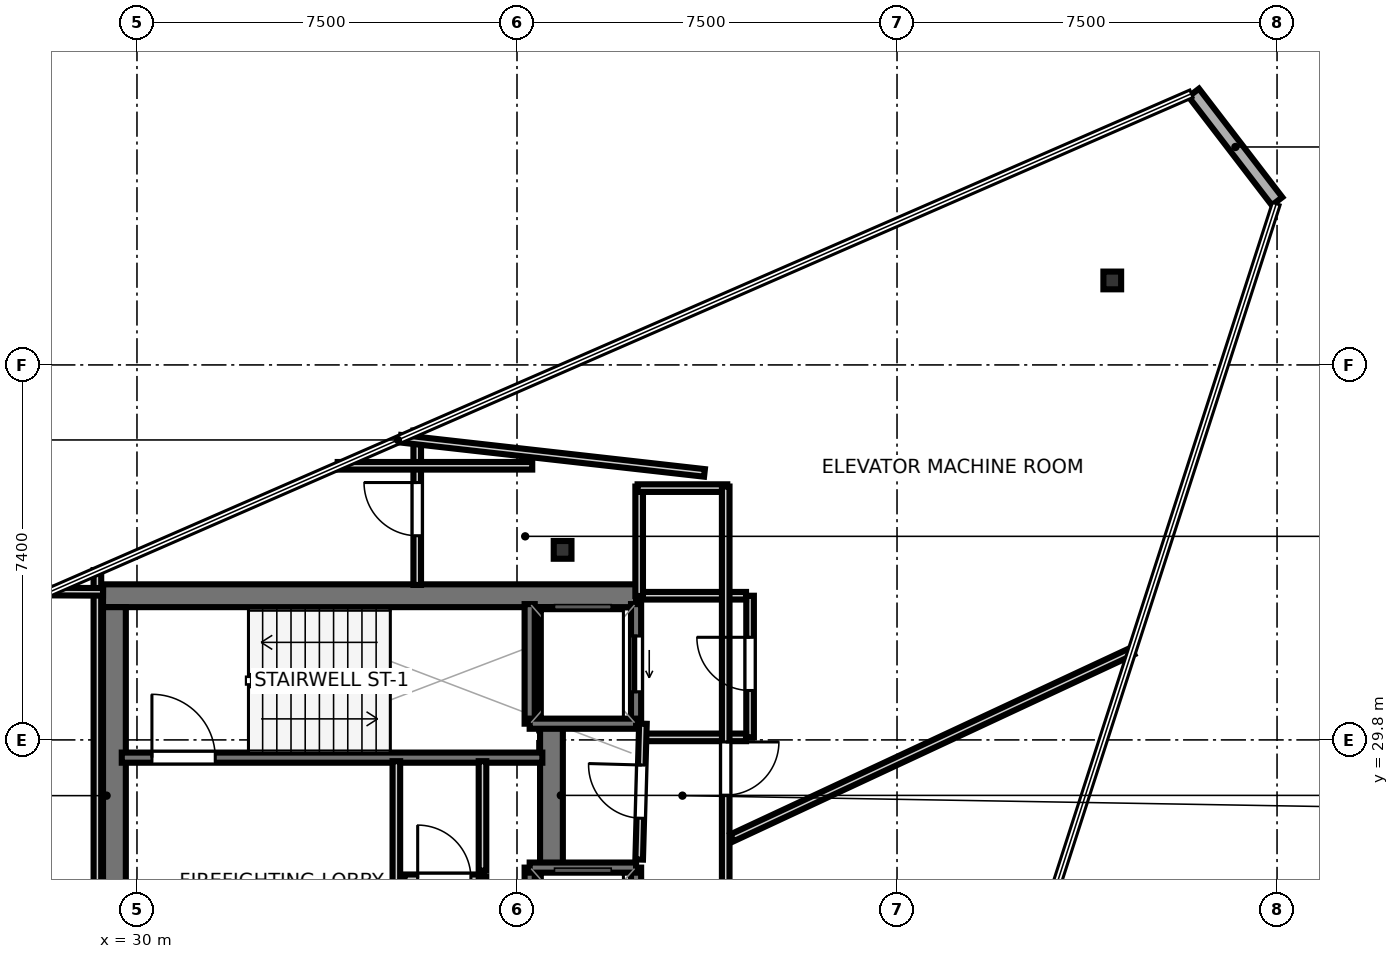
"""IFC4 building model, lengths in metres.
Left out: names, types, materials, properties, quantities, classifications, styles, units other than length and angle.
Written with IfcOpenShell. Run it as: python <this file> out.ifc"""

import sys

from ifc_helpers import new_model, si_unit, direction, frame, frame_2d, origin, origin_2d, place, context, subcontext, project, spatial, rectangle, i_section, extrude, element, fill, save


model = new_model("IFC4")
c1 = context("Model", 3, precision=1e-05, world=origin(), true_north=direction((0.0, 1.0)))
c2 = subcontext(c1, "Body", "Model", "MODEL_VIEW")
j1 = project(units=[si_unit("LENGTHUNIT", "METRE"), si_unit("PLANEANGLEUNIT", "RADIAN")], contexts=[c1])
p1 = place(None, origin())
s1 = spatial("IfcSite", under=j1, at=p1, CompositionType="ELEMENT")
p2 = place(p1, origin())
s2 = spatial("IfcBuilding", under=s1, at=p2, CompositionType="ELEMENT")
p3 = place(p2, frame((0.0, 0.0, 360.05)))
s3 = spatial("IfcBuildingStorey", under=s2, at=p3, CompositionType="ELEMENT", Elevation=360.05)
p4 = place(p3, frame((29.33, 32.645, 0.0), z_axis=(0.0, 0.0, 1.0), x_axis=(1.0, 0.0, 0.0)))
e1 = element("IfcWall", 1, at=p4, inside=s3, PredefinedType="SHEAR", context=c2, shape_type="SweptSolid", body=[
    extrude(rectangle(XDim=10.52, YDim=0.45, at=frame_2d((5.26, 0.0))), origin(), (0.0, 0.0, 1.0), 3.55),
])
for number, where, z_axis, x_axis in (
    (2, (29.555, 24.98, 0.0), (0.0, 0.0, 1.0), (0.0, 1.0, 0.0)),
    (3, (38.18, 24.98, 0.0), (0.0, 0.0, 1.0), (0.0, 1.0, 0.0)),
):
    element("IfcWall", number, at=place(p3, frame(where, z_axis=z_axis, x_axis=x_axis)), inside=s3, PredefinedType="SHEAR", context=c2, shape_type="SweptSolid", body=[
        extrude(rectangle(XDim=7.44, YDim=0.45, at=frame_2d((3.72, 0.0))), origin(), (0.0, 0.0, 1.0), 3.55),
    ])
for number, where, z_axis, x_axis in (
    (4, (38.4, 33.55, 0.0), (0.0, 0.0, 1.0), (1.0, 0.0, 0.0)),
    (5, (49.248, 38.867, 0.0), (0.0, 0.0, 1.0), (1.0, 0.0, 0.0)),
):
    element("IfcColumn", number, at=place(p3, frame(where, z_axis=z_axis, x_axis=x_axis)), inside=s3, PredefinedType="COLUMN", context=c2, shape_type="SweptSolid", body=[
        extrude(i_section(OverallWidth=0.35, OverallDepth=0.35, WebThickness=0.012, FlangeThickness=0.019, at=origin_2d()), origin(), (0.0, 0.0, 1.0), 3.75),
    ])
p5 = place(p3, frame((52.5, 40.43, 0.0), z_axis=(0.0, 0.0, 1.0), x_axis=(-0.608757921377, 0.79335603178, 0.0)))
e6 = element("IfcWall", 6, at=p5, inside=s3, PredefinedType="SOLIDWALL", context=c2, shape_type="SweptSolid", body=[
    extrude(rectangle(XDim=2.701, YDim=0.26, at=frame_2d((1.35, 0.0))), origin(), (0.0, 0.0, 1.0), 3.55),
])
p6 = place(p3, frame((29.7, 29.45, 0.0), z_axis=(0.0, 0.0, 1.0), x_axis=(1.0, 0.0, 0.0)))
e7 = element("IfcWall", 7, at=p6, inside=s3, PredefinedType="SOLIDWALL", context=c2, shape_type="SweptSolid", body=[
    extrude(rectangle(XDim=8.3, YDim=0.2, at=frame_2d((4.15, 0.0))), origin(), (0.0, 0.0, 1.0), 3.55),
])
p7 = place(p6, frame((0.595, 0.0, 0.0)))
e8 = element("IfcOpeningElement", 8, at=p7, cuts=e7, PredefinedType="OPENING", context=c2, shape_type="SweptSolid", body=[
    extrude(rectangle(XDim=1.25, YDim=2.15, at=frame_2d((0.625, 1.075))), frame((0.0, 0.11, 0.0), z_axis=(0.0, -1.0, 0.0), x_axis=(1.0, 0.0, 0.0)), (0.0, 0.0, 1.0), 0.22),
])
p8 = place(p3, frame((39.85, 30.12, 0.0), z_axis=(0.0, 0.0, 1.0), x_axis=(0.0, 1.0, 0.0)))
e9 = element("IfcWall", 9, at=p8, inside=s3, PredefinedType="SOLIDWALL", context=c2, shape_type="SweptSolid", body=[
    extrude(rectangle(XDim=2.36, YDim=0.2, at=frame_2d((1.18, 0.0))), origin(), (0.0, 0.0, 1.0), 3.55),
])
p9 = place(p8, frame((0.63, 0.0, 0.0)))
e10 = element("IfcOpeningElement", 10, at=p9, cuts=e9, PredefinedType="OPENING", context=c2, shape_type="SweptSolid", body=[
    extrude(rectangle(XDim=1.1, YDim=2.15, at=frame_2d((0.55, 1.075))), frame((0.0, 0.11, 0.0), z_axis=(0.0, -1.0, 0.0), x_axis=(1.0, 0.0, 0.0)), (0.0, 0.0, 1.0), 0.22),
])
p10 = place(p3, frame((37.75, 30.12, 0.0), z_axis=(0.0, 0.0, 1.0), x_axis=(0.0, 1.0, 0.0)))
e11 = element("IfcWall", 11, at=p10, inside=s3, PredefinedType="SOLIDWALL", context=c2, shape_type="SweptSolid", body=[
    extrude(rectangle(XDim=2.36, YDim=0.2, at=frame_2d((1.18, 0.0))), origin(), (0.0, 0.0, 1.0), 3.55),
])
p11 = place(p3, frame((37.75, 30.12, 0.0), z_axis=(0.0, 0.0, 1.0), x_axis=(1.0, 0.0, 0.0)))
e12 = element("IfcWall", 12, at=p11, inside=s3, PredefinedType="SOLIDWALL", context=c2, shape_type="SweptSolid", body=[
    extrude(rectangle(XDim=2.1, YDim=0.2, at=frame_2d((1.05, 0.0))), origin(), (0.0, 0.0, 1.0), 3.55),
])
p12 = place(p3, frame((39.85, 24.92, 0.0), z_axis=(0.0, 0.0, 1.0), x_axis=(0.0, 1.0, 0.0)))
e13 = element("IfcWall", 13, at=p12, inside=s3, PredefinedType="SOLIDWALL", context=c2, shape_type="SweptSolid", body=[
    extrude(rectangle(XDim=2.36, YDim=0.2, at=frame_2d((1.18, 0.0))), origin(), (0.0, 0.0, 1.0), 3.55),
])
p13 = place(p12, frame((0.63, 0.0, 0.0)))
e14 = element("IfcOpeningElement", 14, at=p13, cuts=e13, PredefinedType="OPENING", context=c2, shape_type="SweptSolid", body=[
    extrude(rectangle(XDim=1.1, YDim=2.15, at=frame_2d((0.55, 1.075))), frame((0.0, 0.11, 0.0), z_axis=(0.0, -1.0, 0.0), x_axis=(1.0, 0.0, 0.0)), (0.0, 0.0, 1.0), 0.22),
])
p14 = place(p3, frame((37.75, 24.92, 0.0), z_axis=(0.0, 0.0, 1.0), x_axis=(0.0, 1.0, 0.0)))
e15 = element("IfcWall", 15, at=p14, inside=s3, PredefinedType="SOLIDWALL", context=c2, shape_type="SweptSolid", body=[
    extrude(rectangle(XDim=2.36, YDim=0.2, at=frame_2d((1.18, 0.0))), origin(), (0.0, 0.0, 1.0), 3.55),
])
p15 = place(p3, frame((37.75, 27.28, 0.0), z_axis=(0.0, 0.0, 1.0), x_axis=(1.0, 0.0, 0.0)))
e16 = element("IfcWall", 16, at=p15, inside=s3, PredefinedType="SOLIDWALL", context=c2, shape_type="SweptSolid", body=[
    extrude(rectangle(XDim=2.1, YDim=0.2, at=frame_2d((1.05, 0.0))), origin(), (0.0, 0.0, 1.0), 3.55),
])
p16 = place(p3, frame((42.1, 29.85, 0.0), z_axis=(0.0, 0.0, 1.0), x_axis=(0.0, 1.0, 0.0)))
e17 = element("IfcWall", 17, at=p16, inside=s3, PredefinedType="PARTITIONING", context=c2, shape_type="SweptSolid", body=[
    extrude(rectangle(XDim=2.795, YDim=0.15, at=frame_2d((1.397, 0.0))), origin(), (0.0, 0.0, 1.0), 2.87),
])
p17 = place(p16, frame((0.925, 0.0, 0.0)))
e18 = element("IfcOpeningElement", 18, at=p17, cuts=e17, PredefinedType="OPENING", context=c2, shape_type="SweptSolid", body=[
    extrude(rectangle(XDim=1.05, YDim=2.15, at=frame_2d((0.525, 1.075))), frame((0.0, 0.085, 0.0), z_axis=(0.0, -1.0, 0.0), x_axis=(1.0, 0.0, 0.0)), (0.0, 0.0, 1.0), 0.17),
])
for number, where, z_axis, x_axis in (
    (19, (39.96, 29.85, 0.0), (0.0, 0.0, 1.0), (1.0, 0.0, 0.0)),
    (20, (39.96, 32.645, 0.0), (0.0, 0.0, 1.0), (1.0, 0.0, 0.0)),
):
    element("IfcWall", number, at=place(p3, frame(where, z_axis=z_axis, x_axis=x_axis)), inside=s3, PredefinedType="PARTITIONING", context=c2, shape_type="SweptSolid", body=[
        extrude(rectangle(XDim=2.06, YDim=0.15, at=frame_2d((1.03, 0.0))), origin(), (0.0, 0.0, 1.0), 2.87),
    ])
p18 = place(p3, frame((35.119, 29.38, 0.0), z_axis=(0.0, 0.0, 1.0), x_axis=(0.0, -1.0, 0.0)))
e21 = element("IfcWall", 21, at=p18, inside=s3, PredefinedType="PARTITIONING", context=c2, shape_type="SweptSolid", body=[
    extrude(rectangle(XDim=4.96, YDim=0.15, at=frame_2d((2.48, 0.0))), origin(), (0.0, 0.0, 1.0), 2.08),
])
p19 = place(p3, frame((39.911, 27.439, 0.0), z_axis=(0.0, 0.0, 1.0), x_axis=(0.027673579092, 0.999617013171, 0.0)))
e22 = element("IfcWall", 22, at=p19, inside=s3, PredefinedType="PARTITIONING", context=c2, shape_type="SweptSolid", body=[
    extrude(rectangle(XDim=2.682, YDim=0.15, at=frame_2d((1.341, 0.0))), origin(), (0.0, 0.0, 1.0), 2.87),
])
p20 = place(p19, frame((0.816, 0.0, 0.0)))
e23 = element("IfcOpeningElement", 23, at=p20, cuts=e22, PredefinedType="OPENING", context=c2, shape_type="SweptSolid", body=[
    extrude(rectangle(XDim=1.05, YDim=2.15, at=frame_2d((0.525, 1.075))), frame((0.0, 0.085, 0.0), z_axis=(0.0, -1.0, 0.0), x_axis=(1.0, 0.0, 0.0)), (0.0, 0.0, 1.0), 0.17),
])
p21 = place(p3, frame((39.911, 32.64, 0.0), z_axis=(0.0, 0.0, 1.0), x_axis=(0.0, 1.0, 0.0)))
e24 = element("IfcWall", 24, at=p21, inside=s3, PredefinedType="PARTITIONING", context=c2, shape_type="SweptSolid", body=[
    extrude(rectangle(XDim=2.16, YDim=0.15, at=frame_2d((1.08, 0.0))), origin(), (0.0, 0.0, 1.0), 2.87),
])
p22 = place(p3, frame((39.88, 34.769, 0.0), z_axis=(0.0, 0.0, 1.0), x_axis=(1.0, 0.0, 0.0)))
e25 = element("IfcWall", 25, at=p22, inside=s3, PredefinedType="PARTITIONING", context=c2, shape_type="SweptSolid", body=[
    extrude(rectangle(XDim=1.77, YDim=0.15, at=frame_2d((0.885, 0.0))), origin(), (0.0, 0.0, 1.0), 2.87),
])
p23 = place(p3, frame((41.619, 34.8, 0.0), z_axis=(0.0, 0.0, 1.0), x_axis=(0.0, -1.0, 0.0)))
e26 = element("IfcWall", 26, at=p23, inside=s3, PredefinedType="PARTITIONING", context=c2, shape_type="SweptSolid", body=[
    extrude(rectangle(XDim=12.75, YDim=0.15, at=frame_2d((6.375, 0.0))), origin(), (0.0, 0.0, 1.0), 2.87),
])
p24 = place(p23, frame((8.915, 0.0, 0.0)))
e27 = element("IfcOpeningElement", 27, at=p24, cuts=e26, PredefinedType="OPENING", context=c2, shape_type="SweptSolid", body=[
    extrude(rectangle(XDim=1.05, YDim=2.15, at=frame_2d((0.525, 1.075))), frame((0.0, 0.085, 0.0), z_axis=(0.0, -1.0, 0.0), x_axis=(1.0, 0.0, 0.0)), (0.0, 0.0, 1.0), 0.17),
])
p25 = place(p23, frame((5.041, 0.0, 0.0)))
e28 = element("IfcOpeningElement", 28, at=p25, cuts=e26, PredefinedType="OPENING", context=c2, shape_type="SweptSolid", body=[
    extrude(rectangle(XDim=1.05, YDim=2.15, at=frame_2d((0.525, 1.075))), frame((0.0, 0.085, 0.0), z_axis=(0.0, -1.0, 0.0), x_axis=(1.0, 0.0, 0.0)), (0.0, 0.0, 1.0), 0.17),
])
p26 = place(p3, frame((35.28, 27.069, 0.0), z_axis=(0.0, 0.0, 1.0), x_axis=(1.0, 0.0, 0.0)))
e29 = element("IfcWall", 29, at=p26, inside=s3, PredefinedType="PARTITIONING", context=c2, shape_type="SweptSolid", body=[
    extrude(rectangle(XDim=1.57, YDim=0.15, at=frame_2d((0.785, 0.0))), origin(), (0.0, 0.0, 1.0), 2.87),
])
p27 = place(p26, frame((0.26, 0.0, 0.0)))
e30 = element("IfcOpeningElement", 30, at=p27, cuts=e29, PredefinedType="OPENING", context=c2, shape_type="SweptSolid", body=[
    extrude(rectangle(XDim=1.05, YDim=2.15, at=frame_2d((0.525, 1.075))), frame((0.0, 0.085, 0.0), z_axis=(0.0, -1.0, 0.0), x_axis=(1.0, 0.0, 0.0)), (0.0, 0.0, 1.0), 0.17),
])
p28 = place(p3, frame((36.819, 27.1, 0.0), z_axis=(0.0, 0.0, 1.0), x_axis=(0.0, -1.0, 0.0)))
e31 = element("IfcWall", 31, at=p28, inside=s3, PredefinedType="PARTITIONING", context=c2, shape_type="SweptSolid", body=[
    extrude(rectangle(XDim=2.68, YDim=0.15, at=frame_2d((1.34, 0.0))), origin(), (0.0, 0.0, 1.0), 2.87),
])
p29 = place(p3, frame((36.819, 29.38, 0.0), z_axis=(0.0, 0.0, 1.0), x_axis=(0.0, -1.0, 0.0)))
e32 = element("IfcWall", 32, at=p29, inside=s3, PredefinedType="PARTITIONING", context=c2, shape_type="SweptSolid", body=[
    extrude(rectangle(XDim=2.16, YDim=0.15, at=frame_2d((1.08, 0.0))), origin(), (0.0, 0.0, 1.0), 2.87),
])
p30 = place(p3, frame((35.531, 32.858, 0.0), z_axis=(0.0, 0.0, 1.0), x_axis=(0.0, 1.0, 0.0)))
e33 = element("IfcWall", 33, at=p30, inside=s3, PredefinedType="PARTITIONING", context=c2, shape_type="SweptSolid", body=[
    extrude(rectangle(XDim=3.047, YDim=0.15, at=frame_2d((1.524, 0.0))), origin(), (0.0, 0.0, 1.0), 2.87),
])
p31 = place(p30, frame((0.971, 0.0, 0.0)))
e34 = element("IfcOpeningElement", 34, at=p31, cuts=e33, PredefinedType="OPENING", context=c2, shape_type="SweptSolid", body=[
    extrude(rectangle(XDim=1.05, YDim=2.15, at=frame_2d((0.525, 1.075))), frame((0.0, 0.085, 0.0), z_axis=(0.0, -1.0, 0.0), x_axis=(1.0, 0.0, 0.0)), (0.0, 0.0, 1.0), 0.17),
])
p32 = place(p3, frame((35.206, 35.743, 0.0), z_axis=(0.0, 0.0, 1.0), x_axis=(0.993731765799, -0.111790776195, 0.0)))
e35 = element("IfcWall", 35, at=p32, inside=s3, PredefinedType="PARTITIONING", context=c2, shape_type="SweptSolid", body=[
    extrude(rectangle(XDim=6.032, YDim=0.15, at=frame_2d((3.016, 0.0))), origin(), (0.0, 0.0, 1.0), 2.87),
])
p33 = place(p3, frame((29.219, 33.151, 0.0), z_axis=(0.0, 0.0, 1.0), x_axis=(0.0, -1.0, 0.0)))
e36 = element("IfcWall", 36, at=p33, inside=s3, PredefinedType="PARTITIONING", context=c2, shape_type="SweptSolid", body=[
    extrude(rectangle(XDim=8.797, YDim=0.15, at=frame_2d((4.398, 0.0))), origin(), (0.0, 0.0, 1.0), 2.87),
])
p34 = place(p3, frame((41.743, 27.867, 0.0), z_axis=(0.0, 0.0, 1.0), x_axis=(0.906307457026, 0.422618969451, 0.0)))
e37 = element("IfcWall", 37, at=p34, inside=s3, PredefinedType="PARTITIONING", context=c2, shape_type="SweptSolid", body=[
    extrude(rectangle(XDim=8.727, YDim=0.15, at=frame_2d((4.364, 0.0))), origin(), (0.0, 0.0, 1.0), 2.87),
])
p35 = place(p3, frame((37.801, 35.21, 0.0), z_axis=(0.0, 0.0, 1.0), x_axis=(-0.999999981802, -0.000190779011, 0.0)))
e38 = element("IfcWall", 38, at=p35, inside=s3, PredefinedType="PARTITIONING", context=c2, shape_type="SweptSolid", body=[
    extrude(rectangle(XDim=3.839, YDim=0.15, at=frame_2d((1.919, 0.0))), origin(), (0.0, 0.0, 1.0), 2.87),
])
p36 = place(p3, frame((29.33, 32.722, 0.0), z_axis=(0.0, 0.0, 1.0), x_axis=(-0.999987098786, 0.005079592744, 0.0)))
e39 = element("IfcWall", 39, at=p36, inside=s3, PredefinedType="PARTITIONING", context=c2, shape_type="SweptSolid", body=[
    extrude(rectangle(XDim=1.057, YDim=0.15, at=frame_2d((0.529, 0.0))), origin(), (0.0, 0.0, 1.0), 2.87),
])
p37 = place(p7, origin())
e40 = element("IfcDoor", 40, at=p37, inside=s3, OperationType="SINGLE_SWING_LEFT", PredefinedType="DOOR", context=c2, shape_type="SweptSolid", body=[
    extrude(rectangle(XDim=1.25, YDim=2.15, at=frame_2d((0.625, 1.075))), frame((0.0, 0.025, 0.0), z_axis=(0.0, -1.0, 0.0), x_axis=(1.0, 0.0, 0.0)), (0.0, 0.0, 1.0), 0.05),
])
fill(e8, e40)
p38 = place(p9, origin())
e41 = element("IfcDoor", 41, at=p38, inside=s3, OperationType="SLIDING_TO_LEFT", PredefinedType="DOOR", context=c2, shape_type="SweptSolid", body=[
    extrude(rectangle(XDim=1.1, YDim=2.15, at=frame_2d((0.55, 1.075))), frame((0.0, 0.025, 0.0), z_axis=(0.0, -1.0, 0.0), x_axis=(1.0, 0.0, 0.0)), (0.0, 0.0, 1.0), 0.05),
])
fill(e10, e41)
p39 = place(p17, origin())
e42 = element("IfcDoor", 42, at=p39, inside=s3, OperationType="SINGLE_SWING_RIGHT", PredefinedType="DOOR", context=c2, shape_type="SweptSolid", body=[
    extrude(rectangle(XDim=1.05, YDim=2.15, at=frame_2d((0.525, 1.075))), frame((0.0, 0.025, 0.0), z_axis=(0.0, -1.0, 0.0), x_axis=(1.0, 0.0, 0.0)), (0.0, 0.0, 1.0), 0.05),
])
fill(e18, e42)
p40 = place(p27, origin())
e43 = element("IfcDoor", 43, at=p40, inside=s3, OperationType="SINGLE_SWING_LEFT", PredefinedType="DOOR", context=c2, shape_type="SweptSolid", body=[
    extrude(rectangle(XDim=1.05, YDim=2.15, at=frame_2d((0.525, 1.075))), frame((0.0, 0.025, 0.0), z_axis=(0.0, -1.0, 0.0), x_axis=(1.0, 0.0, 0.0)), (0.0, 0.0, 1.0), 0.05),
])
fill(e30, e43)
p41 = place(p25, origin())
e44 = element("IfcDoor", 44, at=p41, inside=s3, OperationType="SINGLE_SWING_LEFT", PredefinedType="DOOR", context=c2, shape_type="SweptSolid", body=[
    extrude(rectangle(XDim=1.05, YDim=2.15, at=frame_2d((0.525, 1.075))), frame((0.0, 0.025, 0.0), z_axis=(0.0, -1.0, 0.0), x_axis=(1.0, 0.0, 0.0)), (0.0, 0.0, 1.0), 0.05),
])
fill(e28, e44)
p42 = place(p20, origin())
e45 = element("IfcDoor", 45, at=p42, inside=s3, OperationType="SINGLE_SWING_RIGHT", PredefinedType="DOOR", context=c2, shape_type="SweptSolid", body=[
    extrude(rectangle(XDim=1.05, YDim=2.15, at=frame_2d((0.525, 1.075))), frame((0.0, 0.025, 0.0), z_axis=(0.0, -1.0, 0.0), x_axis=(1.0, 0.0, 0.0)), (0.0, 0.0, 1.0), 0.05),
])
fill(e23, e45)
p43 = place(p31, origin())
e46 = element("IfcDoor", 46, at=p43, inside=s3, OperationType="SINGLE_SWING_RIGHT", PredefinedType="DOOR", context=c2, shape_type="SweptSolid", body=[
    extrude(rectangle(XDim=1.05, YDim=2.15, at=frame_2d((0.525, 1.075))), frame((0.0, 0.025, 0.0), z_axis=(0.0, -1.0, 0.0), x_axis=(1.0, 0.0, 0.0)), (0.0, 0.0, 1.0), 0.05),
])
fill(e34, e46)
save(model, sys.argv[1])
